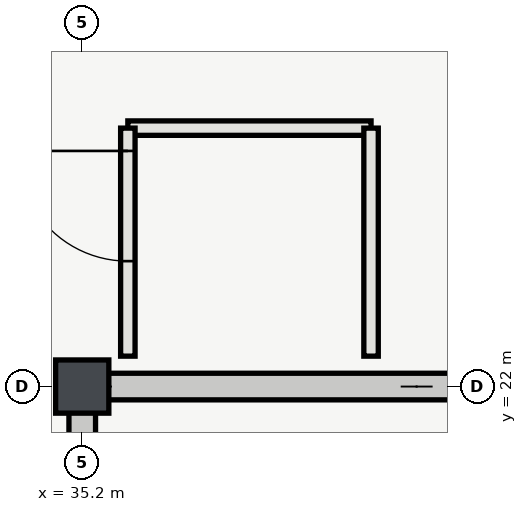
"""IFC4 building model, lengths in metres.
Left out: names, types, materials, properties, quantities, classifications, styles, units other than length and angle.
Written with IfcOpenShell. Run it as: python <this file> out.ifc"""

import sys

from ifc_helpers import new_model, si_unit, direction, frame, frame_2d, origin, origin_2d, place, context, subcontext, project, spatial, rectangle, extrude, element, fill, save


model = new_model("IFC4")
c1 = context("Model", 3, precision=1e-05, world=origin(), true_north=direction((0.0, 1.0)))
c2 = subcontext(c1, "Body", "Model", "MODEL_VIEW")
j1 = project(units=[si_unit("LENGTHUNIT", "METRE"), si_unit("PLANEANGLEUNIT", "RADIAN")], contexts=[c1])
p1 = place(None, origin())
s1 = spatial("IfcSite", under=j1, at=p1, CompositionType="ELEMENT")
p2 = place(p1, origin())
s2 = spatial("IfcBuilding", under=s1, at=p2, CompositionType="ELEMENT")
p3 = place(p2, frame((0.0, 0.0, -4.8)))
s3 = spatial("IfcBuildingStorey", under=s2, at=p3, CompositionType="ELEMENT", Elevation=-4.8)
p4 = place(p3, frame((35.2, 22.0, 0.0), z_axis=(0.0, 0.0, 1.0), x_axis=(1.0, 0.0, 0.0)))
e1 = element("IfcColumn", 1, at=p4, inside=s3, PredefinedType="COLUMN", context=c2, shape_type="SweptSolid", body=[
    extrude(rectangle(XDim=0.7, YDim=0.7, at=origin_2d()), origin(), (0.0, 0.0, 1.0), 4.8),
])
p5 = place(p3, frame((44.175, 22.0, 0.0), z_axis=(0.0, 0.0, 1.0), x_axis=(-1.0, 0.0, 0.0)))
e2 = element("IfcWall", 2, at=p5, inside=s3, PredefinedType="SHEAR", context=c2, shape_type="SweptSolid", body=[
    extrude(rectangle(XDim=9.15, YDim=0.35, at=frame_2d((4.575, 0.0))), origin(), (0.0, 0.0, 1.0), 4.52),
])
p6 = place(p3, frame((35.2, 14.175, 0.0), z_axis=(0.0, 0.0, 1.0), x_axis=(0.0, 1.0, 0.0)))
e3 = element("IfcWall", 3, at=p6, inside=s3, PredefinedType="SHEAR", context=c2, shape_type="SweptSolid", body=[
    extrude(rectangle(XDim=7.65, YDim=0.35, at=frame_2d((3.825, 0.0))), origin(), (0.0, 0.0, 1.0), 4.52),
])
p7 = place(p6, frame((1.625, 0.0, 0.0)))
e4 = element("IfcOpeningElement", 4, at=p7, cuts=e3, PredefinedType="OPENING", context=c2, shape_type="SweptSolid", body=[
    extrude(rectangle(XDim=1.4, YDim=2.2, at=frame_2d((0.7, 1.1))), frame((0.0, 0.185, 0.0), z_axis=(0.0, -1.0, 0.0), x_axis=(1.0, 0.0, 0.0)), (0.0, 0.0, 1.0), 0.37),
])
p8 = place(p6, frame((5.725, 0.0, 0.0)))
e5 = element("IfcOpeningElement", 5, at=p8, cuts=e3, PredefinedType="OPENING", context=c2, shape_type="SweptSolid", body=[
    extrude(rectangle(XDim=1.0, YDim=2.15, at=frame_2d((0.5, 1.075))), frame((0.0, 0.185, 0.0), z_axis=(0.0, -1.0, 0.0), x_axis=(1.0, 0.0, 0.0)), (0.0, 0.0, 1.0), 0.37),
])
p9 = place(p3, frame((39.0, 25.4, 0.0), z_axis=(0.0, 0.0, 1.0), x_axis=(-1.0, 0.0, 0.0)))
e6 = element("IfcWall", 6, at=p9, inside=s3, PredefinedType="PARTITIONING", context=c2, shape_type="SweptSolid", body=[
    extrude(rectangle(XDim=3.2, YDim=0.19, at=frame_2d((1.6, 0.0))), origin(), (0.0, 0.0, 1.0), 4.52),
])
p10 = place(p3, frame((35.8, 25.4, 0.0), z_axis=(0.0, 0.0, 1.0), x_axis=(0.0, -1.0, 0.0)))
e7 = element("IfcWall", 7, at=p10, inside=s3, PredefinedType="PARTITIONING", context=c2, shape_type="SweptSolid", body=[
    extrude(rectangle(XDim=3.0, YDim=0.19, at=frame_2d((1.5, 0.0))), origin(), (0.0, 0.0, 1.0), 4.52),
])
p11 = place(p10, frame((0.3, 0.0, 0.0)))
e8 = element("IfcOpeningElement", 8, at=p11, cuts=e7, PredefinedType="OPENING", context=c2, shape_type="SweptSolid", body=[
    extrude(rectangle(XDim=1.45, YDim=2.2, at=frame_2d((0.725, 1.1))), frame((0.0, 0.105, 0.0), z_axis=(0.0, -1.0, 0.0), x_axis=(1.0, 0.0, 0.0)), (0.0, 0.0, 1.0), 0.21),
])
p12 = place(p3, frame((39.0, 22.4, 0.0), z_axis=(0.0, 0.0, 1.0), x_axis=(0.0, 1.0, 0.0)))
e9 = element("IfcWall", 9, at=p12, inside=s3, PredefinedType="PARTITIONING", context=c2, shape_type="SweptSolid", body=[
    extrude(rectangle(XDim=3.0, YDim=0.19, at=frame_2d((1.5, 0.0))), origin(), (0.0, 0.0, 1.0), 4.52),
])
p13 = place(p11, origin())
e10 = element("IfcDoor", 10, at=p13, inside=s3, OperationType="SINGLE_SWING_LEFT", PredefinedType="DOOR", context=c2, shape_type="SweptSolid", body=[
    extrude(rectangle(XDim=1.45, YDim=2.2, at=frame_2d((0.725, 1.1))), frame((0.0, 0.025, 0.0), z_axis=(0.0, -1.0, 0.0), x_axis=(1.0, 0.0, 0.0)), (0.0, 0.0, 1.0), 0.05),
])
fill(e8, e10)
save(model, sys.argv[1])
